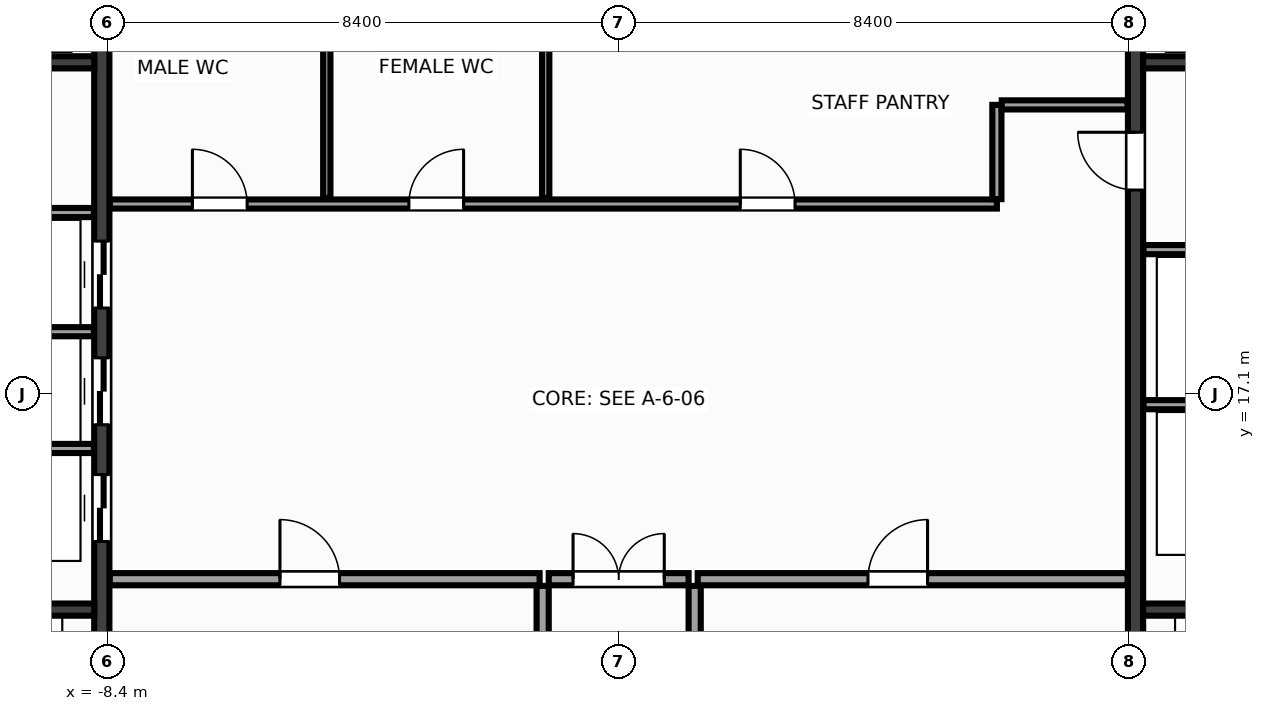
"""IFC4 building model, lengths in metres.
Left out: names, types, materials, properties, quantities, classifications, styles, units other than length and angle.
Written with IfcOpenShell. Run it as: python <this file> out.ifc"""

import sys

from ifc_helpers import new_model, si_unit, direction, frame, frame_2d, origin, place, context, subcontext, project, spatial, rectangle, extrude, source, transform, mapped, element, fill, save


model = new_model("IFC4")
c1 = context("Model", 3, precision=1e-05, world=origin(), true_north=direction((0.0, 1.0)))
c2 = subcontext(c1, "Body", "Model", "MODEL_VIEW")
j1 = project(units=[si_unit("LENGTHUNIT", "METRE"), si_unit("PLANEANGLEUNIT", "RADIAN")], contexts=[c1])
p1 = place(None, origin())
s1 = spatial("IfcSite", under=j1, at=p1, CompositionType="ELEMENT")
p2 = place(p1, origin())
s2 = spatial("IfcBuilding", under=s1, at=p2, CompositionType="ELEMENT")
p3 = place(p2, frame((0.0, 0.0, 200.0)))
s3 = spatial("IfcBuildingStorey", under=s2, at=p3, CompositionType="ELEMENT", Elevation=200.0)
m1 = source(origin(), c2, "Body", "SweptSolid", [
    extrude(rectangle(XDim=13.1, YDim=0.25, at=frame_2d((6.55, 0.0))), origin(), (0.0, 0.0, 1.0), 3.6),
])
p4 = place(p3, frame((-8.5, 10.45, 0.0), z_axis=(0.0, 0.0, 1.0), x_axis=(0.0, 1.0, 0.0)))
e1 = element("IfcWall", 1, at=p4, inside=s3, PredefinedType="SHEAR", context=c2, shape_type="MappedRepresentation", body=[
    mapped(m1, transform((0.0, 0.0, 0.0), x_axis=(1.0, 0.0, 0.0), y_axis=(0.0, 1.0, 0.0), z_axis=(0.0, 0.0, 1.0), scale=1.0)),
])
p5 = place(p4, frame((4.22, 0.0, 0.0)))
e2 = element("IfcOpeningElement", 2, at=p5, cuts=e1, PredefinedType="OPENING", context=c2, shape_type="SweptSolid", body=[
    extrude(rectangle(XDim=1.1, YDim=2.15, at=frame_2d((0.55, 1.075))), frame((0.0, 0.137, 0.0), z_axis=(0.0, -1.0, 0.0), x_axis=(1.0, 0.0, 0.0)), (0.0, 0.0, 1.0), 0.274),
])
p6 = place(p4, frame((6.14, 0.0, 0.0)))
e3 = element("IfcOpeningElement", 3, at=p6, cuts=e1, PredefinedType="OPENING", context=c2, shape_type="SweptSolid", body=[
    extrude(rectangle(XDim=1.1, YDim=2.15, at=frame_2d((0.55, 1.075))), frame((0.0, 0.137, 0.0), z_axis=(0.0, -1.0, 0.0), x_axis=(1.0, 0.0, 0.0)), (0.0, 0.0, 1.0), 0.274),
])
p7 = place(p4, frame((8.06, 0.0, 0.0)))
e4 = element("IfcOpeningElement", 4, at=p7, cuts=e1, PredefinedType="OPENING", context=c2, shape_type="SweptSolid", body=[
    extrude(rectangle(XDim=1.1, YDim=2.15, at=frame_2d((0.55, 1.075))), frame((0.0, 0.137, 0.0), z_axis=(0.0, -1.0, 0.0), x_axis=(1.0, 0.0, 0.0)), (0.0, 0.0, 1.0), 0.274),
])
p8 = place(p3, frame((8.5, 10.45, 0.0), z_axis=(0.0, 0.0, 1.0), x_axis=(0.0, 1.0, 0.0)))
e5 = element("IfcWall", 5, at=p8, inside=s3, PredefinedType="SHEAR", context=c2, shape_type="MappedRepresentation", body=[
    mapped(m1, transform((0.0, 0.0, 0.0), x_axis=(1.0, 0.0, 0.0), y_axis=(0.0, 1.0, 0.0), z_axis=(0.0, 0.0, 1.0), scale=1.0)),
])
p9 = place(p8, frame((10.0, 0.0, 0.0)))
e6 = element("IfcOpeningElement", 6, at=p9, cuts=e5, PredefinedType="OPENING", context=c2, shape_type="SweptSolid", body=[
    extrude(rectangle(XDim=0.95, YDim=2.15, at=frame_2d((0.475, 1.075))), frame((0.0, 0.137, 0.0), z_axis=(0.0, -1.0, 0.0), x_axis=(1.0, 0.0, 0.0)), (0.0, 0.0, 1.0), 0.274),
])
m2 = source(origin(), c2, "Body", "SweptSolid", [
    extrude(rectangle(XDim=2.825, YDim=0.2, at=frame_2d((1.413, 0.0))), origin(), (0.0, 0.0, 1.0), 3.6),
])
for number, where, z_axis, x_axis in (
    (7, (-11.45, 13.55, 0.0), (0.0, 0.0, 1.0), (1.0, 0.0, 0.0)),
    (8, (8.625, 13.55, 0.0), (0.0, 0.0, 1.0), (1.0, 0.0, 0.0)),
):
    element("IfcWall", number, at=place(p3, frame(where, z_axis=z_axis, x_axis=x_axis)), inside=s3, PredefinedType="SHEAR", context=c2, shape_type="MappedRepresentation", body=[
        mapped(m2, transform((0.0, 0.0, 0.0), x_axis=(1.0, 0.0, 0.0), y_axis=(0.0, 1.0, 0.0), z_axis=(0.0, 0.0, 1.0), scale=1.0)),
    ])
m3 = source(origin(), c2, "Body", "SweptSolid", [
    extrude(rectangle(XDim=3.02, YDim=0.2, at=frame_2d((1.51, 0.0))), origin(), (0.0, 0.0, 1.0), 3.6),
])
for number, where, z_axis, x_axis in (
    (9, (-11.645, 22.55, 0.0), (0.0, 0.0, 1.0), (1.0, 0.0, 0.0)),
    (10, (8.625, 22.55, 0.0), (0.0, 0.0, 1.0), (1.0, 0.0, 0.0)),
):
    element("IfcWall", number, at=place(p3, frame(where, z_axis=z_axis, x_axis=x_axis)), inside=s3, PredefinedType="SHEAR", context=c2, shape_type="MappedRepresentation", body=[
        mapped(m3, transform((0.0, 0.0, 0.0), x_axis=(1.0, 0.0, 0.0), y_axis=(0.0, 1.0, 0.0), z_axis=(0.0, 0.0, 1.0), scale=1.0)),
    ])
m4 = source(origin(), c2, "Body", "SweptSolid", [
    extrude(rectangle(XDim=3.01, YDim=0.15, at=frame_2d((1.505, 0.0))), origin(), (0.0, 0.0, 1.0), 3.38),
])
for number, where, z_axis, x_axis in (
    (11, (-11.64, 16.2, 0.0), (0.0, 0.0, 1.0), (1.0, 0.0, 0.0)),
    (12, (-11.64, 18.12, 0.0), (0.0, 0.0, 1.0), (1.0, 0.0, 0.0)),
    (13, (-11.64, 20.08, 0.0), (0.0, 0.0, 1.0), (1.0, 0.0, 0.0)),
    (14, (8.63, 16.92, 0.0), (0.0, 0.0, 1.0), (1.0, 0.0, 0.0)),
    (15, (8.63, 19.47, 0.0), (0.0, 0.0, 1.0), (1.0, 0.0, 0.0)),
):
    element("IfcWall", number, at=place(p3, frame(where, z_axis=z_axis, x_axis=x_axis)), inside=s3, PredefinedType="PARTITIONING", context=c2, shape_type="MappedRepresentation", body=[
        mapped(m4, transform((0.0, 0.0, 0.0), x_axis=(1.0, 0.0, 0.0), y_axis=(0.0, 1.0, 0.0), z_axis=(0.0, 0.0, 1.0), scale=1.0)),
    ])
m5 = source(origin(), c2, "Body", "SweptSolid", [
    extrude(rectangle(XDim=7.07, YDim=0.2, at=frame_2d((3.535, 0.0))), origin(), (0.0, 0.0, 1.0), 3.38),
])
p10 = place(p3, frame((-8.37, 14.05, 0.0), z_axis=(0.0, 0.0, 1.0), x_axis=(1.0, 0.0, 0.0)))
e16 = element("IfcWall", 16, at=p10, inside=s3, PredefinedType="PARTITIONING", context=c2, shape_type="MappedRepresentation", body=[
    mapped(m5, transform((0.0, 0.0, 0.0), x_axis=(1.0, 0.0, 0.0), y_axis=(0.0, 1.0, 0.0), z_axis=(0.0, 0.0, 1.0), scale=1.0)),
])
p11 = place(p10, frame((2.8, 0.0, 0.0)))
e17 = element("IfcOpeningElement", 17, at=p11, cuts=e16, PredefinedType="OPENING", context=c2, shape_type="SweptSolid", body=[
    extrude(rectangle(XDim=0.98, YDim=2.15, at=frame_2d((0.49, 1.075))), frame((0.0, 0.112, 0.0), z_axis=(0.0, -1.0, 0.0), x_axis=(1.0, 0.0, 0.0)), (0.0, 0.0, 1.0), 0.224),
])
p12 = place(p3, frame((1.3, 14.05, 0.0), z_axis=(0.0, 0.0, 1.0), x_axis=(1.0, 0.0, 0.0)))
e18 = element("IfcWall", 18, at=p12, inside=s3, PredefinedType="PARTITIONING", context=c2, shape_type="MappedRepresentation", body=[
    mapped(m5, transform((0.0, 0.0, 0.0), x_axis=(1.0, 0.0, 0.0), y_axis=(0.0, 1.0, 0.0), z_axis=(0.0, 0.0, 1.0), scale=1.0)),
])
p13 = place(p12, frame((2.8, 0.0, 0.0)))
e19 = element("IfcOpeningElement", 19, at=p13, cuts=e18, PredefinedType="OPENING", context=c2, shape_type="SweptSolid", body=[
    extrude(rectangle(XDim=0.98, YDim=2.15, at=frame_2d((0.49, 1.075))), frame((0.0, 0.112, 0.0), z_axis=(0.0, -1.0, 0.0), x_axis=(1.0, 0.0, 0.0)), (0.0, 0.0, 1.0), 0.224),
])
m6 = source(origin(), c2, "Body", "SweptSolid", [
    extrude(rectangle(XDim=3.49, YDim=0.2, at=frame_2d((1.745, 0.0))), origin(), (0.0, 0.0, 1.0), 3.38),
])
for number, where, z_axis, x_axis in (
    (20, (-1.25, 10.45, 0.0), (0.0, 0.0, 1.0), (0.0, 1.0, 0.0)),
    (21, (1.25, 10.45, 0.0), (0.0, 0.0, 1.0), (0.0, 1.0, 0.0)),
):
    element("IfcWall", number, at=place(p3, frame(where, z_axis=z_axis, x_axis=x_axis)), inside=s3, PredefinedType="PARTITIONING", context=c2, shape_type="MappedRepresentation", body=[
        mapped(m6, transform((0.0, 0.0, 0.0), x_axis=(1.0, 0.0, 0.0), y_axis=(0.0, 1.0, 0.0), z_axis=(0.0, 0.0, 1.0), scale=1.0)),
    ])
m7 = source(origin(), c2, "Body", "SweptSolid", [
    extrude(rectangle(XDim=2.3, YDim=0.2, at=frame_2d((1.15, 0.0))), origin(), (0.0, 0.0, 1.0), 3.38),
])
p14 = place(p3, frame((-1.15, 14.05, 0.0), z_axis=(0.0, 0.0, 1.0), x_axis=(1.0, 0.0, 0.0)))
e22 = element("IfcWall", 22, at=p14, inside=s3, PredefinedType="PARTITIONING", context=c2, shape_type="MappedRepresentation", body=[
    mapped(m7, transform((0.0, 0.0, 0.0), x_axis=(1.0, 0.0, 0.0), y_axis=(0.0, 1.0, 0.0), z_axis=(0.0, 0.0, 1.0), scale=1.0)),
])
p15 = place(p14, frame((0.4, 0.0, 0.0)))
e23 = element("IfcOpeningElement", 23, at=p15, cuts=e22, PredefinedType="OPENING", context=c2, shape_type="SweptSolid", body=[
    extrude(rectangle(XDim=1.5, YDim=2.2, at=frame_2d((0.75, 1.1))), frame((0.0, 0.112, 0.0), z_axis=(0.0, -1.0, 0.0), x_axis=(1.0, 0.0, 0.0)), (0.0, 0.0, 1.0), 0.224),
])
m8 = source(origin(), c2, "Body", "SweptSolid", [
    extrude(rectangle(XDim=14.59, YDim=0.15, at=frame_2d((7.295, 0.0))), origin(), (0.0, 0.0, 1.0), 3.38),
])
p16 = place(p3, frame((-8.37, 20.22, 0.0), z_axis=(0.0, 0.0, 1.0), x_axis=(1.0, 0.0, 0.0)))
e24 = element("IfcWall", 24, at=p16, inside=s3, PredefinedType="PARTITIONING", context=c2, shape_type="MappedRepresentation", body=[
    mapped(m8, transform((0.0, 0.0, 0.0), x_axis=(1.0, 0.0, 0.0), y_axis=(0.0, 1.0, 0.0), z_axis=(0.0, 0.0, 1.0), scale=1.0)),
])
p17 = place(p16, frame((1.36, 0.0, 0.0)))
e25 = element("IfcOpeningElement", 25, at=p17, cuts=e24, PredefinedType="OPENING", context=c2, shape_type="SweptSolid", body=[
    extrude(rectangle(XDim=0.9, YDim=2.15, at=frame_2d((0.45, 1.075))), frame((0.0, 0.087, 0.0), z_axis=(0.0, -1.0, 0.0), x_axis=(1.0, 0.0, 0.0)), (0.0, 0.0, 1.0), 0.174),
])
p18 = place(p16, frame((4.92, 0.0, 0.0)))
e26 = element("IfcOpeningElement", 26, at=p18, cuts=e24, PredefinedType="OPENING", context=c2, shape_type="SweptSolid", body=[
    extrude(rectangle(XDim=0.9, YDim=2.15, at=frame_2d((0.45, 1.075))), frame((0.0, 0.087, 0.0), z_axis=(0.0, -1.0, 0.0), x_axis=(1.0, 0.0, 0.0)), (0.0, 0.0, 1.0), 0.174),
])
p19 = place(p16, frame((10.37, 0.0, 0.0)))
e27 = element("IfcOpeningElement", 27, at=p19, cuts=e24, PredefinedType="OPENING", context=c2, shape_type="SweptSolid", body=[
    extrude(rectangle(XDim=0.9, YDim=2.15, at=frame_2d((0.45, 1.075))), frame((0.0, 0.087, 0.0), z_axis=(0.0, -1.0, 0.0), x_axis=(1.0, 0.0, 0.0)), (0.0, 0.0, 1.0), 0.174),
])
m9 = source(origin(), c2, "Body", "SweptSolid", [
    extrude(rectangle(XDim=1.55, YDim=0.15, at=frame_2d((0.775, 0.0))), origin(), (0.0, 0.0, 1.0), 3.38),
])
p20 = place(p3, frame((6.22, 20.3, 0.0), z_axis=(0.0, 0.0, 1.0), x_axis=(0.0, 1.0, 0.0)))
e28 = element("IfcWall", 28, at=p20, inside=s3, PredefinedType="PARTITIONING", context=c2, shape_type="MappedRepresentation", body=[
    mapped(m9, transform((0.0, 0.0, 0.0), x_axis=(1.0, 0.0, 0.0), y_axis=(0.0, 1.0, 0.0), z_axis=(0.0, 0.0, 1.0), scale=1.0)),
])
m10 = source(origin(), c2, "Body", "SweptSolid", [
    extrude(rectangle(XDim=2.07, YDim=0.15, at=frame_2d((1.035, 0.0))), origin(), (0.0, 0.0, 1.0), 3.38),
])
p21 = place(p3, frame((6.3, 21.85, 0.0), z_axis=(0.0, 0.0, 1.0), x_axis=(1.0, 0.0, 0.0)))
e29 = element("IfcWall", 29, at=p21, inside=s3, PredefinedType="PARTITIONING", context=c2, shape_type="MappedRepresentation", body=[
    mapped(m10, transform((0.0, 0.0, 0.0), x_axis=(1.0, 0.0, 0.0), y_axis=(0.0, 1.0, 0.0), z_axis=(0.0, 0.0, 1.0), scale=1.0)),
])
m11 = source(origin(), c2, "Body", "SweptSolid", [
    extrude(rectangle(XDim=3.19, YDim=0.12, at=frame_2d((1.595, 0.0))), origin(), (0.0, 0.0, 1.0), 3.38),
])
for number, where, z_axis, x_axis in (
    (30, (-4.8, 20.32, 0.0), (0.0, 0.0, 1.0), (0.0, 1.0, 0.0)),
    (31, (-1.2, 20.32, 0.0), (0.0, 0.0, 1.0), (0.0, 1.0, 0.0)),
):
    element("IfcWall", number, at=place(p3, frame(where, z_axis=z_axis, x_axis=x_axis)), inside=s3, PredefinedType="PARTITIONING", context=c2, shape_type="MappedRepresentation", body=[
        mapped(m11, transform((0.0, 0.0, 0.0), x_axis=(1.0, 0.0, 0.0), y_axis=(0.0, 1.0, 0.0), z_axis=(0.0, 0.0, 1.0), scale=1.0)),
    ])
m12 = source(origin(), c2, "Body", "SweptSolid", [
    extrude(rectangle(XDim=1.1, YDim=2.15, at=frame_2d((0.55, 1.075))), frame((0.0, 0.025, 0.0), z_axis=(0.0, -1.0, 0.0), x_axis=(1.0, 0.0, 0.0)), (0.0, 0.0, 1.0), 0.05),
])
p22 = place(p5, origin())
e32 = element("IfcDoor", 32, at=p22, inside=s3, OperationType="DOUBLE_DOOR_SLIDING", PredefinedType="DOOR", context=c2, shape_type="MappedRepresentation", body=[
    mapped(m12, transform((0.0, 0.0, 0.0), x_axis=(1.0, 0.0, 0.0), y_axis=(0.0, 1.0, 0.0), z_axis=(0.0, 0.0, 1.0), scale=1.0)),
])
fill(e2, e32)
p23 = place(p6, origin())
e33 = element("IfcDoor", 33, at=p23, inside=s3, OperationType="DOUBLE_DOOR_SLIDING", PredefinedType="DOOR", context=c2, shape_type="MappedRepresentation", body=[
    mapped(m12, transform((0.0, 0.0, 0.0), x_axis=(1.0, 0.0, 0.0), y_axis=(0.0, 1.0, 0.0), z_axis=(0.0, 0.0, 1.0), scale=1.0)),
])
fill(e3, e33)
p24 = place(p7, origin())
e34 = element("IfcDoor", 34, at=p24, inside=s3, OperationType="DOUBLE_DOOR_SLIDING", PredefinedType="DOOR", context=c2, shape_type="MappedRepresentation", body=[
    mapped(m12, transform((0.0, 0.0, 0.0), x_axis=(1.0, 0.0, 0.0), y_axis=(0.0, 1.0, 0.0), z_axis=(0.0, 0.0, 1.0), scale=1.0)),
])
fill(e4, e34)
m13 = source(origin(), c2, "Body", "SweptSolid", [
    extrude(rectangle(XDim=0.95, YDim=2.15, at=frame_2d((0.475, 1.075))), frame((0.0, 0.025, 0.0), z_axis=(0.0, -1.0, 0.0), x_axis=(1.0, 0.0, 0.0)), (0.0, 0.0, 1.0), 0.05),
])
p25 = place(p9, origin())
e35 = element("IfcDoor", 35, at=p25, inside=s3, OperationType="SINGLE_SWING_RIGHT", PredefinedType="DOOR", context=c2, shape_type="MappedRepresentation", body=[
    mapped(m13, transform((0.0, 0.0, 0.0), x_axis=(1.0, 0.0, 0.0), y_axis=(0.0, 1.0, 0.0), z_axis=(0.0, 0.0, 1.0), scale=1.0)),
])
fill(e6, e35)
m14 = source(origin(), c2, "Body", "SweptSolid", [
    extrude(rectangle(XDim=0.98, YDim=2.15, at=frame_2d((0.49, 1.075))), frame((0.0, 0.025, 0.0), z_axis=(0.0, -1.0, 0.0), x_axis=(1.0, 0.0, 0.0)), (0.0, 0.0, 1.0), 0.05),
])
p26 = place(p11, origin())
e36 = element("IfcDoor", 36, at=p26, inside=s3, OperationType="SINGLE_SWING_LEFT", PredefinedType="DOOR", context=c2, shape_type="MappedRepresentation", body=[
    mapped(m14, transform((0.0, 0.0, 0.0), x_axis=(1.0, 0.0, 0.0), y_axis=(0.0, 1.0, 0.0), z_axis=(0.0, 0.0, 1.0), scale=1.0)),
])
fill(e17, e36)
p27 = place(p13, origin())
e37 = element("IfcDoor", 37, at=p27, inside=s3, OperationType="SINGLE_SWING_RIGHT", PredefinedType="DOOR", context=c2, shape_type="MappedRepresentation", body=[
    mapped(m14, transform((0.0, 0.0, 0.0), x_axis=(1.0, 0.0, 0.0), y_axis=(0.0, 1.0, 0.0), z_axis=(0.0, 0.0, 1.0), scale=1.0)),
])
fill(e19, e37)
m15 = source(origin(), c2, "Body", "SweptSolid", [
    extrude(rectangle(XDim=1.5, YDim=2.2, at=frame_2d((0.75, 1.1))), frame((0.0, 0.025, 0.0), z_axis=(0.0, -1.0, 0.0), x_axis=(1.0, 0.0, 0.0)), (0.0, 0.0, 1.0), 0.05),
])
p28 = place(p15, origin())
e38 = element("IfcDoor", 38, at=p28, inside=s3, OperationType="DOUBLE_DOOR_SINGLE_SWING", PredefinedType="DOOR", context=c2, shape_type="MappedRepresentation", body=[
    mapped(m15, transform((0.0, 0.0, 0.0), x_axis=(1.0, 0.0, 0.0), y_axis=(0.0, 1.0, 0.0), z_axis=(0.0, 0.0, 1.0), scale=1.0)),
])
fill(e23, e38)
m16 = source(origin(), c2, "Body", "SweptSolid", [
    extrude(rectangle(XDim=0.9, YDim=2.15, at=frame_2d((0.45, 1.075))), frame((0.0, 0.025, 0.0), z_axis=(0.0, -1.0, 0.0), x_axis=(1.0, 0.0, 0.0)), (0.0, 0.0, 1.0), 0.05),
])
p29 = place(p17, origin())
e39 = element("IfcDoor", 39, at=p29, inside=s3, OperationType="SINGLE_SWING_LEFT", PredefinedType="DOOR", context=c2, shape_type="MappedRepresentation", body=[
    mapped(m16, transform((0.0, 0.0, 0.0), x_axis=(1.0, 0.0, 0.0), y_axis=(0.0, 1.0, 0.0), z_axis=(0.0, 0.0, 1.0), scale=1.0)),
])
fill(e25, e39)
p30 = place(p18, origin())
e40 = element("IfcDoor", 40, at=p30, inside=s3, OperationType="SINGLE_SWING_RIGHT", PredefinedType="DOOR", context=c2, shape_type="MappedRepresentation", body=[
    mapped(m16, transform((0.0, 0.0, 0.0), x_axis=(1.0, 0.0, 0.0), y_axis=(0.0, 1.0, 0.0), z_axis=(0.0, 0.0, 1.0), scale=1.0)),
])
fill(e26, e40)
p31 = place(p19, origin())
e41 = element("IfcDoor", 41, at=p31, inside=s3, OperationType="SINGLE_SWING_LEFT", PredefinedType="DOOR", context=c2, shape_type="MappedRepresentation", body=[
    mapped(m16, transform((0.0, 0.0, 0.0), x_axis=(1.0, 0.0, 0.0), y_axis=(0.0, 1.0, 0.0), z_axis=(0.0, 0.0, 1.0), scale=1.0)),
])
fill(e27, e41)
save(model, sys.argv[1])
